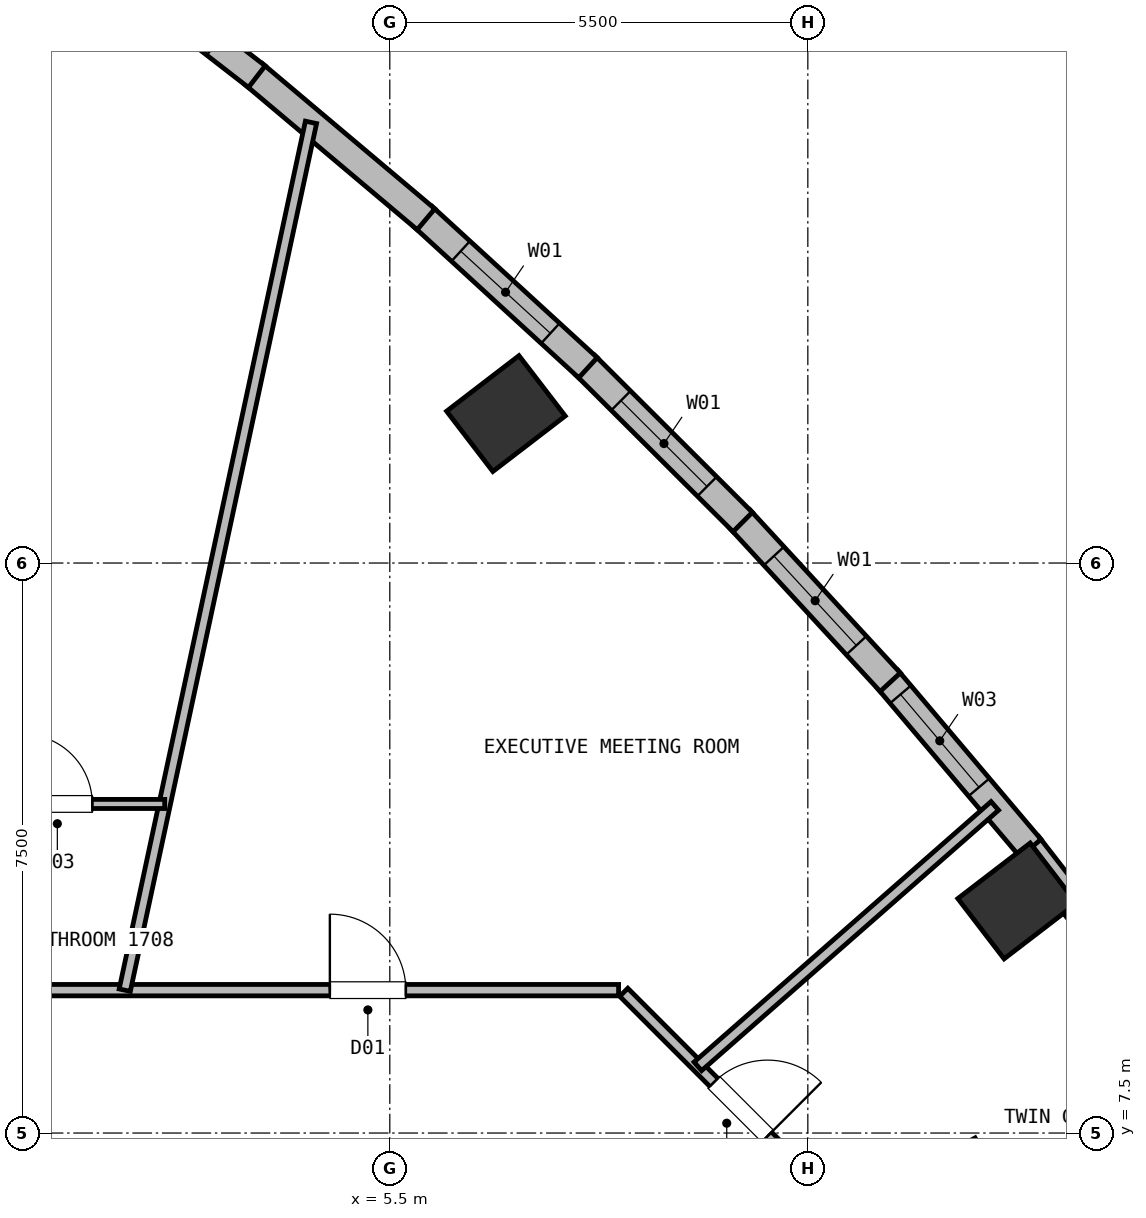
"""IFC4 building model, lengths in metres.
Left out: names, types, materials, properties, quantities, classifications, styles, units other than length and angle.
Written with IfcOpenShell. Run it as: python <this file> out.ifc"""

import sys

from ifc_helpers import new_model, si_unit, direction, frame, frame_2d, origin, origin_2d, place, context, subcontext, project, spatial, rectangle, extrude, element, fill, save


model = new_model("IFC4")
c1 = context("Model", 3, precision=1e-05, world=origin(), true_north=direction((0.0, 1.0)))
c2 = subcontext(c1, "Body", "Model", "MODEL_VIEW")
j1 = project(units=[si_unit("LENGTHUNIT", "METRE"), si_unit("PLANEANGLEUNIT", "RADIAN")], contexts=[c1])
p1 = place(None, origin())
s1 = spatial("IfcSite", under=j1, at=p1, CompositionType="ELEMENT")
p2 = place(p1, origin())
s2 = spatial("IfcBuilding", under=s1, at=p2, CompositionType="ELEMENT")
p3 = place(p2, frame((0.0, 0.0, 60.5)))
s3 = spatial("IfcBuildingStorey", under=s2, at=p3, CompositionType="ELEMENT", Elevation=60.5)
for number, where, z_axis, x_axis in (
    (1, (13.754, 10.554, 0.0), (0.0, 0.0, 1.0), (-0.609, 0.793, 0.0)),
    (2, (7.028, 16.966, 0.0), (0.0, 0.0, 1.0), (-0.609, 0.793, 0.0)),
):
    element("IfcColumn", number, at=place(p3, frame(where, z_axis=z_axis, x_axis=x_axis)), inside=s3, PredefinedType="COLUMN", context=c2, shape_type="SweptSolid", body=[
        extrude(rectangle(XDim=1.0, YDim=1.2, at=origin_2d()), origin(), (0.0, 0.0, 1.0), 3.75),
    ])
p4 = place(p3, frame((13.899, 11.287, 0.0), z_axis=(0.0, 0.0, 1.0), x_axis=(0.612545453358, -0.79043536584, 0.0)))
e3 = element("IfcWall", 3, at=p4, inside=s3, PredefinedType="SOLIDWALL", context=c2, shape_type="SweptSolid", body=[
    extrude(rectangle(XDim=2.909, YDim=0.36, at=frame_2d((1.455, 0.0))), origin(), (0.0, 0.0, 1.0), 3.5),
])
p5 = place(p3, frame((12.051, 13.47, 0.0), z_axis=(0.0, 0.0, 1.0), x_axis=(0.645836916795, -0.763475393779, 0.0)))
e4 = element("IfcWall", 4, at=p5, inside=s3, PredefinedType="SOLIDWALL", context=c2, shape_type="SweptSolid", body=[
    extrude(rectangle(XDim=2.91, YDim=0.36, at=frame_2d((1.455, 0.0))), origin(), (0.0, 0.0, 1.0), 3.5),
])
p6 = place(p5, frame((0.26, 0.0, 0.72)))
e5 = element("IfcOpeningElement", 5, at=p6, cuts=e4, PredefinedType="OPENING", context=c2, shape_type="SweptSolid", body=[
    extrude(rectangle(XDim=1.6, YDim=1.88, at=frame_2d((0.8, 0.94))), frame((0.0, 0.19, 0.0), z_axis=(0.0, -1.0, 0.0), x_axis=(1.0, 0.0, 0.0)), (0.0, 0.0, 1.0), 0.38),
])
p7 = place(p3, frame((10.109, 15.576, 0.0), z_axis=(0.0, 0.0, 1.0), x_axis=(0.677705882399, -0.735333078925, 0.0)))
e6 = element("IfcWall", 6, at=p7, inside=s3, PredefinedType="SOLIDWALL", context=c2, shape_type="SweptSolid", body=[
    extrude(rectangle(XDim=2.915, YDim=0.36, at=frame_2d((1.458, 0.0))), origin(), (0.0, 0.0, 1.0), 3.5),
])
p8 = place(p7, frame((0.657, 0.0, 0.72)))
e7 = element("IfcOpeningElement", 7, at=p8, cuts=e6, PredefinedType="OPENING", context=c2, shape_type="SweptSolid", body=[
    extrude(rectangle(XDim=1.6, YDim=1.88, at=frame_2d((0.8, 0.94))), frame((0.0, 0.19, 0.0), z_axis=(0.0, -1.0, 0.0), x_axis=(1.0, 0.0, 0.0)), (0.0, 0.0, 1.0), 0.38),
])
p9 = place(p3, frame((8.071, 17.604, 0.0), z_axis=(0.0, 0.0, 1.0), x_axis=(0.708357483008, -0.705853863251, 0.0)))
e8 = element("IfcWall", 8, at=p9, inside=s3, PredefinedType="SOLIDWALL", context=c2, shape_type="SweptSolid", body=[
    extrude(rectangle(XDim=2.926, YDim=0.36, at=frame_2d((1.463, 0.0))), origin(), (0.0, 0.0, 1.0), 3.5),
])
p10 = place(p9, frame((0.663, 0.0, 0.72)))
e9 = element("IfcOpeningElement", 9, at=p10, cuts=e8, PredefinedType="OPENING", context=c2, shape_type="SweptSolid", body=[
    extrude(rectangle(XDim=1.6, YDim=1.88, at=frame_2d((0.8, 0.94))), frame((0.0, 0.19, 0.0), z_axis=(0.0, -1.0, 0.0), x_axis=(1.0, 0.0, 0.0)), (0.0, 0.0, 1.0), 0.38),
])
p11 = place(p3, frame((5.939, 19.556, 0.0), z_axis=(0.0, 0.0, 1.0), x_axis=(0.73735397448, -0.67550656275, 0.0)))
e10 = element("IfcWall", 10, at=p11, inside=s3, PredefinedType="SOLIDWALL", context=c2, shape_type="SweptSolid", body=[
    extrude(rectangle(XDim=2.941, YDim=0.36, at=frame_2d((1.47, 0.0))), origin(), (0.0, 0.0, 1.0), 3.5),
])
p12 = place(p11, frame((0.67, 0.0, 0.72)))
e11 = element("IfcOpeningElement", 11, at=p12, cuts=e10, PredefinedType="OPENING", context=c2, shape_type="SweptSolid", body=[
    extrude(rectangle(XDim=1.6, YDim=1.88, at=frame_2d((0.8, 0.94))), frame((0.0, 0.19, 0.0), z_axis=(0.0, -1.0, 0.0), x_axis=(1.0, 0.0, 0.0)), (0.0, 0.0, 1.0), 0.38),
])
p13 = place(p3, frame((3.711, 21.431, 0.0), z_axis=(0.0, 0.0, 1.0), x_axis=(0.764797881092, -0.644270285732, 0.0)))
e12 = element("IfcWall", 12, at=p13, inside=s3, PredefinedType="SOLIDWALL", context=c2, shape_type="SweptSolid", body=[
    extrude(rectangle(XDim=2.961, YDim=0.36, at=frame_2d((1.481, 0.0))), origin(), (0.0, 0.0, 1.0), 3.5),
])
p14 = place(p3, frame((1.389, 23.229, 0.0), z_axis=(0.0, 0.0, 1.0), x_axis=(0.79052584694, -0.612428677742, 0.0)))
e13 = element("IfcWall", 13, at=p14, inside=s3, PredefinedType="SOLIDWALL", context=c2, shape_type="SweptSolid", body=[
    extrude(rectangle(XDim=2.987, YDim=0.36, at=frame_2d((1.494, 0.0))), origin(), (0.0, 0.0, 1.0), 3.5),
])
p15 = place(p14, frame((0.694, 0.0, 0.72)))
e14 = element("IfcOpeningElement", 14, at=p15, cuts=e13, PredefinedType="OPENING", context=c2, shape_type="SweptSolid", body=[
    extrude(rectangle(XDim=1.6, YDim=1.88, at=frame_2d((0.8, 0.94))), frame((0.0, 0.19, 0.0), z_axis=(0.0, -1.0, 0.0), x_axis=(1.0, 0.0, 0.0)), (0.0, 0.0, 1.0), 0.38),
])
p16 = place(p3, frame((8.578, 9.352, 0.0), z_axis=(0.0, 0.0, 1.0), x_axis=(0.707067066127, -0.707146494016, 0.0)))
e15 = element("IfcWall", 15, at=p16, inside=s3, PredefinedType="PARTITIONING", context=c2, shape_type="SweptSolid", body=[
    extrude(rectangle(XDim=3.074, YDim=0.15, at=frame_2d((1.537, 0.0))), origin(), (0.0, 0.0, 1.0), 3.5),
])
p17 = place(p16, frame((1.676, 0.0, 0.0)))
e16 = element("IfcOpeningElement", 16, at=p17, cuts=e15, PredefinedType="OPENING", context=c2, shape_type="SweptSolid", body=[
    extrude(rectangle(XDim=1.0, YDim=2.15, at=frame_2d((0.5, 1.075))), frame((0.0, 0.085, 0.0), z_axis=(0.0, -1.0, 0.0), x_axis=(1.0, 0.0, 0.0)), (0.0, 0.0, 1.0), 0.17),
])
p18 = place(p3, frame((-8.51, 9.38, 0.0), z_axis=(0.0, 0.0, 1.0), x_axis=(1.0, 0.0, 0.0)))
e17 = element("IfcWall", 17, at=p18, inside=s3, PredefinedType="PARTITIONING", context=c2, shape_type="SweptSolid", body=[
    extrude(rectangle(XDim=17.02, YDim=0.15, at=frame_2d((8.51, 0.0))), origin(), (0.0, 0.0, 1.0), 3.5),
])
p19 = place(p18, frame((4.177, 0.0, 0.0)))
e18 = element("IfcOpeningElement", 18, at=p19, cuts=e17, PredefinedType="OPENING", context=c2, shape_type="SweptSolid", body=[
    extrude(rectangle(XDim=0.95, YDim=2.1, at=frame_2d((0.475, 1.05))), frame((0.0, 0.085, 0.0), z_axis=(0.0, -1.0, 0.0), x_axis=(1.0, 0.0, 0.0)), (0.0, 0.0, 1.0), 0.17),
])
p20 = place(p18, frame((0.14, 0.0, 0.0)))
e19 = element("IfcOpeningElement", 19, at=p20, cuts=e17, PredefinedType="OPENING", context=c2, shape_type="SweptSolid", body=[
    extrude(rectangle(XDim=0.95, YDim=2.1, at=frame_2d((0.475, 1.05))), frame((0.0, 0.085, 0.0), z_axis=(0.0, -1.0, 0.0), x_axis=(1.0, 0.0, 0.0)), (0.0, 0.0, 1.0), 0.17),
])
p21 = place(p18, frame((2.194, 0.0, 0.0)))
e20 = element("IfcOpeningElement", 20, at=p21, cuts=e17, PredefinedType="OPENING", context=c2, shape_type="SweptSolid", body=[
    extrude(rectangle(XDim=1.0, YDim=2.15, at=frame_2d((0.5, 1.075))), frame((0.0, 0.085, 0.0), z_axis=(0.0, -1.0, 0.0), x_axis=(1.0, 0.0, 0.0)), (0.0, 0.0, 1.0), 0.17),
])
p22 = place(p18, frame((13.221, 0.0, 0.0)))
e21 = element("IfcOpeningElement", 21, at=p22, cuts=e17, PredefinedType="OPENING", context=c2, shape_type="SweptSolid", body=[
    extrude(rectangle(XDim=1.0, YDim=2.15, at=frame_2d((0.5, 1.075))), frame((0.0, 0.085, 0.0), z_axis=(0.0, -1.0, 0.0), x_axis=(1.0, 0.0, 0.0)), (0.0, 0.0, 1.0), 0.17),
])
p23 = place(p18, frame((6.498, 0.0, 0.0)))
e22 = element("IfcOpeningElement", 22, at=p23, cuts=e17, PredefinedType="OPENING", context=c2, shape_type="SweptSolid", body=[
    extrude(rectangle(XDim=1.06, YDim=2.15, at=frame_2d((0.53, 1.075))), frame((0.0, 0.085, 0.0), z_axis=(0.0, -1.0, 0.0), x_axis=(1.0, 0.0, 0.0)), (0.0, 0.0, 1.0), 0.17),
])
p24 = place(p3, frame((13.23, 7.384, 0.0), z_axis=(0.0, 0.0, 1.0), x_axis=(-0.873232148454, -0.487304437602, 0.0)))
e23 = element("IfcWall", 23, at=p24, inside=s3, PredefinedType="PARTITIONING", context=c2, shape_type="SweptSolid", body=[
    extrude(rectangle(XDim=2.806, YDim=0.12, at=frame_2d((1.403, 0.0))), origin(), (0.0, 0.0, 1.0), 3.5),
])
p25 = place(p3, frame((9.552, 8.377, 0.0), z_axis=(0.0, 0.0, 1.0), x_axis=(0.75184000053, 0.659345594967, 0.0)))
e24 = element("IfcWall", 24, at=p25, inside=s3, PredefinedType="PARTITIONING", context=c2, shape_type="SweptSolid", body=[
    extrude(rectangle(XDim=5.197, YDim=0.15, at=frame_2d((2.599, 0.0))), origin(), (0.0, 0.0, 1.0), 3.5),
])
p26 = place(p3, frame((2.013, 9.38, 0.0), z_axis=(0.0, 0.0, 1.0), x_axis=(0.209810339196, 0.977742103812, 0.0)))
e25 = element("IfcWall", 25, at=p26, inside=s3, PredefinedType="PARTITIONING", context=c2, shape_type="SweptSolid", body=[
    extrude(rectangle(XDim=11.678, YDim=0.15, at=frame_2d((5.839, 0.0))), origin(), (0.0, 0.0, 1.0), 3.5),
])
p27 = place(p3, frame((-0.287, 11.83, 0.0), z_axis=(0.0, 0.0, 1.0), x_axis=(1.0, 0.0, 0.0)))
e26 = element("IfcWall", 26, at=p27, inside=s3, PredefinedType="PARTITIONING", context=c2, shape_type="SweptSolid", body=[
    extrude(rectangle(XDim=2.825, YDim=0.12, at=frame_2d((1.413, 0.0))), origin(), (0.0, 0.0, 1.0), 3.5),
])
p28 = place(p27, frame((0.953, 0.0, 0.0)))
e27 = element("IfcOpeningElement", 27, at=p28, cuts=e26, PredefinedType="OPENING", context=c2, shape_type="SweptSolid", body=[
    extrude(rectangle(XDim=0.92, YDim=2.1, at=frame_2d((0.46, 1.05))), frame((0.0, 0.07, 0.0), z_axis=(0.0, -1.0, 0.0), x_axis=(1.0, 0.0, 0.0)), (0.0, 0.0, 1.0), 0.14),
])
p29 = place(p6, origin())
e28 = element("IfcWindow", 28, at=p29, inside=s3, PartitioningType="SINGLE_PANEL", PredefinedType="WINDOW", context=c2, shape_type="SweptSolid", body=[
    extrude(rectangle(XDim=1.6, YDim=1.88, at=frame_2d((0.8, 0.94))), frame((0.0, 0.03, 0.0), z_axis=(0.0, -1.0, 0.0), x_axis=(1.0, 0.0, 0.0)), (0.0, 0.0, 1.0), 0.06),
])
fill(e5, e28)
p30 = place(p8, origin())
e29 = element("IfcWindow", 29, at=p30, inside=s3, PartitioningType="SINGLE_PANEL", PredefinedType="WINDOW", context=c2, shape_type="SweptSolid", body=[
    extrude(rectangle(XDim=1.6, YDim=1.88, at=frame_2d((0.8, 0.94))), frame((0.0, 0.03, 0.0), z_axis=(0.0, -1.0, 0.0), x_axis=(1.0, 0.0, 0.0)), (0.0, 0.0, 1.0), 0.06),
])
fill(e7, e29)
p31 = place(p10, origin())
e30 = element("IfcWindow", 30, at=p31, inside=s3, PartitioningType="SINGLE_PANEL", PredefinedType="WINDOW", context=c2, shape_type="SweptSolid", body=[
    extrude(rectangle(XDim=1.6, YDim=1.88, at=frame_2d((0.8, 0.94))), frame((0.0, 0.03, 0.0), z_axis=(0.0, -1.0, 0.0), x_axis=(1.0, 0.0, 0.0)), (0.0, 0.0, 1.0), 0.06),
])
fill(e9, e30)
p32 = place(p12, origin())
e31 = element("IfcWindow", 31, at=p32, inside=s3, PartitioningType="SINGLE_PANEL", PredefinedType="WINDOW", context=c2, shape_type="SweptSolid", body=[
    extrude(rectangle(XDim=1.6, YDim=1.88, at=frame_2d((0.8, 0.94))), frame((0.0, 0.03, 0.0), z_axis=(0.0, -1.0, 0.0), x_axis=(1.0, 0.0, 0.0)), (0.0, 0.0, 1.0), 0.06),
])
fill(e11, e31)
p33 = place(p28, origin())
e32 = element("IfcDoor", 32, at=p33, inside=s3, OperationType="SINGLE_SWING_LEFT", PredefinedType="DOOR", context=c2, shape_type="SweptSolid", body=[
    extrude(rectangle(XDim=0.92, YDim=2.1, at=frame_2d((0.46, 1.05))), frame((0.0, 0.025, 0.0), z_axis=(0.0, -1.0, 0.0), x_axis=(1.0, 0.0, 0.0)), (0.0, 0.0, 1.0), 0.05),
])
fill(e27, e32)
p34 = place(p17, origin())
e33 = element("IfcDoor", 33, at=p34, inside=s3, OperationType="SINGLE_SWING_RIGHT", PredefinedType="DOOR", context=c2, shape_type="SweptSolid", body=[
    extrude(rectangle(XDim=1.0, YDim=2.15, at=frame_2d((0.5, 1.075))), frame((0.0, 0.025, 0.0), z_axis=(0.0, -1.0, 0.0), x_axis=(1.0, 0.0, 0.0)), (0.0, 0.0, 1.0), 0.05),
])
fill(e16, e33)
p35 = place(p22, origin())
e34 = element("IfcDoor", 34, at=p35, inside=s3, OperationType="SINGLE_SWING_LEFT", PredefinedType="DOOR", context=c2, shape_type="SweptSolid", body=[
    extrude(rectangle(XDim=1.0, YDim=2.15, at=frame_2d((0.5, 1.075))), frame((0.0, 0.025, 0.0), z_axis=(0.0, -1.0, 0.0), x_axis=(1.0, 0.0, 0.0)), (0.0, 0.0, 1.0), 0.05),
])
fill(e21, e34)
save(model, sys.argv[1])
